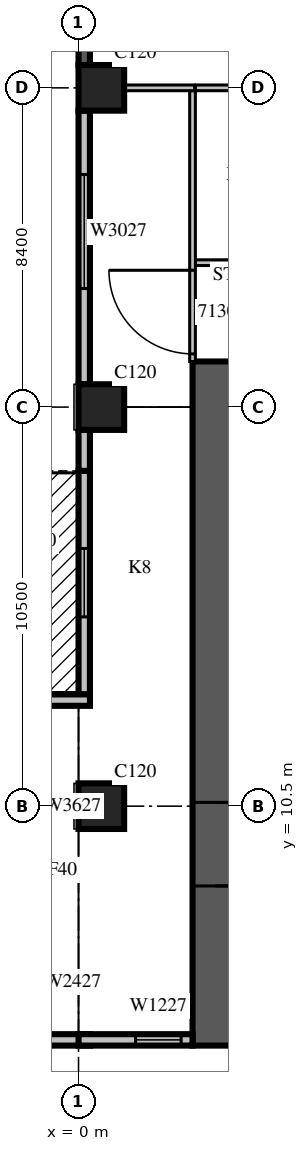
"""IFC4 building model, lengths in metres.
Left out: names, types, materials, properties, quantities, classifications, styles, units other than length and angle.
Written with IfcOpenShell. Run it as: python <this file> out.ifc"""

import sys

from ifc_helpers import new_model, si_unit, direction, frame, frame_2d, origin, origin_2d, place, context, subcontext, project, spatial, rectangle, extrude, source, transform, mapped, element, fill, save


model = new_model("IFC4")
c1 = context("Model", 3, precision=1e-05, world=origin(), true_north=direction((0.0, 1.0)))
c2 = subcontext(c1, "Body", "Model", "MODEL_VIEW")
j1 = project(units=[si_unit("LENGTHUNIT", "METRE"), si_unit("PLANEANGLEUNIT", "RADIAN")], contexts=[c1])
p1 = place(None, origin())
s1 = spatial("IfcSite", under=j1, at=p1, CompositionType="ELEMENT")
p2 = place(p1, origin())
s2 = spatial("IfcBuilding", under=s1, at=p2, CompositionType="ELEMENT")
p3 = place(p2, frame((0.0, 0.0, 65.7)))
s3 = spatial("IfcBuildingStorey", under=s2, at=p3, CompositionType="ELEMENT", Elevation=65.7)
m1 = source(origin(), c2, "Body", "SweptSolid", [
    extrude(rectangle(XDim=1.2, YDim=1.2, at=origin_2d()), origin(), (0.0, 0.0, 1.0), 4.2),
])
for number, where, z_axis, x_axis in (
    (1, (0.6, 10.5, 0.0), (0.0, 0.0, 1.0), (1.0, 0.0, 0.0)),
    (2, (0.6, 21.0, 0.0), (0.0, 0.0, 1.0), (1.0, 0.0, 0.0)),
    (3, (0.6, 29.4, 0.0), (0.0, 0.0, 1.0), (1.0, 0.0, 0.0)),
):
    element("IfcColumn", number, at=place(p3, frame(where, z_axis=z_axis, x_axis=x_axis)), inside=s3, PredefinedType="COLUMN", context=c2, shape_type="MappedRepresentation", body=[
        mapped(m1, transform((0.0, 0.0, 0.0), scale=1.0)),
    ])
m2 = source(origin(), c2, "Body", "SweptSolid", [
    extrude(rectangle(XDim=18.0, YDim=1.2, at=frame_2d((9.0, 0.0))), origin(), (0.0, 0.0, 1.0), 4.2),
])
p4 = place(p3, frame((3.6, 4.2, 0.0), z_axis=(0.0, 0.0, 1.0), x_axis=(0.0, 1.0, 0.0)))
e4 = element("IfcWall", 4, at=p4, inside=s3, PredefinedType="SHEAR", context=c2, shape_type="MappedRepresentation", body=[
    mapped(m2, transform((0.0, 0.0, 0.0), scale=1.0)),
])
m3 = source(origin(), c2, "Body", "SweptSolid", [
    extrude(rectangle(XDim=2.2, YDim=2.1, at=frame_2d((1.1, 1.05))), frame((0.0, 0.61, 0.0), z_axis=(0.0, -1.0, 0.0), x_axis=(1.0, 0.0, 0.0)), (0.0, 0.0, 1.0), 1.22),
])
p5 = place(p4, frame((4.2, 0.0, 0.0)))
e5 = element("IfcOpeningElement", 5, at=p5, cuts=e4, PredefinedType="OPENING", context=c2, shape_type="MappedRepresentation", body=[
    mapped(m3, transform((0.0, 0.0, 0.0), scale=1.0)),
])
m4 = source(origin(), c2, "Body", "SweptSolid", [
    extrude(rectangle(XDim=4.2, YDim=0.3, at=frame_2d((2.1, 0.0))), origin(), (0.0, 0.0, 1.0), 3.8),
])
p6 = place(p3, frame((0.15, 34.2, 0.0), z_axis=(0.0, 0.0, 1.0), x_axis=(0.0, -1.0, 0.0)))
e6 = element("IfcWall", 6, at=p6, inside=s3, PredefinedType="SOLIDWALL", context=c2, shape_type="MappedRepresentation", body=[
    mapped(m4, transform((0.0, 0.0, 0.0), scale=1.0)),
])
m5 = source(origin(), c2, "Body", "SweptSolid", [
    extrude(rectangle(XDim=2.4, YDim=2.7, at=frame_2d((1.2, 1.35))), frame((0.0, 0.16, 0.0), z_axis=(0.0, -1.0, 0.0), x_axis=(1.0, 0.0, 0.0)), (0.0, 0.0, 1.0), 0.32),
])
p7 = place(p6, frame((0.7, 0.0, 0.6)))
e7 = element("IfcOpeningElement", 7, at=p7, cuts=e6, PredefinedType="OPENING", context=c2, shape_type="MappedRepresentation", body=[
    mapped(m5, transform((0.0, 0.0, 0.0), scale=1.0)),
])
m6 = source(origin(), c2, "Body", "SweptSolid", [
    extrude(rectangle(XDim=7.2, YDim=0.3, at=frame_2d((3.6, 0.0))), origin(), (0.0, 0.0, 1.0), 3.8),
])
p8 = place(p3, frame((0.15, 28.8, 0.0), z_axis=(0.0, 0.0, 1.0), x_axis=(0.0, -1.0, 0.0)))
e8 = element("IfcWall", 8, at=p8, inside=s3, PredefinedType="STANDARD", context=c2, shape_type="MappedRepresentation", body=[
    mapped(m6, transform((0.0, 0.0, 0.0), scale=1.0)),
])
m7 = source(origin(), c2, "Body", "SweptSolid", [
    extrude(rectangle(XDim=3.0, YDim=2.7, at=frame_2d((1.5, 1.35))), frame((0.0, 0.16, 0.0), z_axis=(0.0, -1.0, 0.0), x_axis=(1.0, 0.0, 0.0)), (0.0, 0.0, 1.0), 0.32),
])
p9 = place(p8, frame((1.68, 0.0, 0.6)))
e9 = element("IfcOpeningElement", 9, at=p9, cuts=e8, PredefinedType="OPENING", context=c2, shape_type="MappedRepresentation", body=[
    mapped(m7, transform((0.0, 0.0, 0.0), scale=1.0)),
])
m8 = source(origin(), c2, "Body", "SweptSolid", [
    extrude(rectangle(XDim=1.08, YDim=0.3, at=frame_2d((0.54, 0.0))), origin(), (0.0, 0.0, 1.0), 3.8),
])
p10 = place(p3, frame((0.15, 20.4, 0.0), z_axis=(0.0, 0.0, 1.0), x_axis=(0.0, -1.0, 0.0)))
e10 = element("IfcWall", 10, at=p10, inside=s3, PredefinedType="STANDARD", context=c2, shape_type="MappedRepresentation", body=[
    mapped(m8, transform((0.0, 0.0, 0.0), scale=1.0)),
])
m9 = source(origin(), c2, "Body", "SweptSolid", [
    extrude(rectangle(XDim=5.88, YDim=0.3, at=frame_2d((2.94, 0.0))), origin(), (0.0, 0.0, 1.0), 3.8),
])
p11 = place(p3, frame((0.15, 19.32, 0.0), z_axis=(0.0, 0.0, 1.0), x_axis=(0.0, -1.0, 0.0)))
e11 = element("IfcWall", 11, at=p11, inside=s3, PredefinedType="STANDARD", context=c2, shape_type="MappedRepresentation", body=[
    mapped(m9, transform((0.0, 0.0, 0.0), scale=1.0)),
])
m10 = source(origin(), c2, "Body", "SweptSolid", [
    extrude(rectangle(XDim=1.8, YDim=2.4, at=frame_2d((0.9, 1.2))), frame((0.0, 0.16, 0.0), z_axis=(0.0, -1.0, 0.0), x_axis=(1.0, 0.0, 0.0)), (0.0, 0.0, 1.0), 0.32),
])
p12 = place(p11, frame((2.04, 0.0, 0.0)))
e12 = element("IfcOpeningElement", 12, at=p12, cuts=e11, PredefinedType="OPENING", context=c2, shape_type="MappedRepresentation", body=[
    mapped(m10, transform((0.0, 0.0, 0.0), scale=1.0)),
])
m11 = source(origin(), c2, "Body", "SweptSolid", [
    extrude(rectangle(XDim=1.2, YDim=0.3, at=frame_2d((0.6, 0.0))), origin(), (0.0, 0.0, 1.0), 3.8),
])
for number, where, z_axis, x_axis in (
    (13, (0.3, 13.29, 0.0), (0.0, 0.0, 1.0), (-1.0, 0.0, 0.0)),
    (14, (0.3, 4.35, 0.0), (0.0, 0.0, 1.0), (-1.0, 0.0, 0.0)),
):
    element("IfcWall", number, at=place(p3, frame(where, z_axis=z_axis, x_axis=x_axis)), inside=s3, PredefinedType="STANDARD", context=c2, shape_type="MappedRepresentation", body=[
        mapped(m11, transform((0.0, 0.0, 0.0), scale=1.0)),
    ])
m12 = source(origin(), c2, "Body", "SweptSolid", [
    extrude(rectangle(XDim=3.0, YDim=0.3, at=frame_2d((1.5, 0.0))), origin(), (0.0, 0.0, 1.0), 3.8),
])
p13 = place(p3, frame((0.0, 4.35, 0.0), z_axis=(0.0, 0.0, 1.0), x_axis=(1.0, 0.0, 0.0)))
e15 = element("IfcWall", 15, at=p13, inside=s3, PredefinedType="STANDARD", context=c2, shape_type="MappedRepresentation", body=[
    mapped(m12, transform((0.0, 0.0, 0.0), scale=1.0)),
])
m13 = source(origin(), c2, "Body", "SweptSolid", [
    extrude(rectangle(XDim=1.2, YDim=2.7, at=frame_2d((0.6, 1.35))), frame((0.0, 0.16, 0.0), z_axis=(0.0, -1.0, 0.0), x_axis=(1.0, 0.0, 0.0)), (0.0, 0.0, 1.0), 0.32),
])
p14 = place(p13, frame((1.5, 0.0, 0.6)))
e16 = element("IfcOpeningElement", 16, at=p14, cuts=e15, PredefinedType="OPENING", context=c2, shape_type="MappedRepresentation", body=[
    mapped(m13, transform((0.0, 0.0, 0.0), scale=1.0)),
])
m14 = source(origin(), c2, "Body", "SweptSolid", [
    extrude(rectangle(XDim=11.925, YDim=0.15, at=frame_2d((5.963, 0.0))), origin(), (0.0, 0.0, 1.0), 3.8),
])
p15 = place(p3, frame((3.075, 24.8, 0.0), z_axis=(0.0, 0.0, 1.0), x_axis=(1.0, 0.0, 0.0)))
e17 = element("IfcWall", 17, at=p15, inside=s3, PredefinedType="PARTITIONING", context=c2, shape_type="MappedRepresentation", body=[
    mapped(m14, transform((0.0, 0.0, 0.0), scale=1.0)),
])
m15 = source(origin(), c2, "Body", "SweptSolid", [
    extrude(rectangle(XDim=0.9, YDim=2.1, at=frame_2d((0.45, 1.05))), frame((0.0, 0.085, 0.0), z_axis=(0.0, -1.0, 0.0), x_axis=(1.0, 0.0, 0.0)), (0.0, 0.0, 1.0), 0.17),
])
p16 = place(p15, frame((2.062, 0.0, 0.0)))
e18 = element("IfcOpeningElement", 18, at=p16, cuts=e17, PredefinedType="OPENING", context=c2, shape_type="MappedRepresentation", body=[
    mapped(m15, transform((0.0, 0.0, 0.0), scale=1.0)),
])
p17 = place(p15, frame((8.9, 0.0, 0.0)))
e19 = element("IfcOpeningElement", 19, at=p17, cuts=e17, PredefinedType="OPENING", context=c2, shape_type="MappedRepresentation", body=[
    mapped(m15, transform((0.0, 0.0, 0.0), scale=1.0)),
])
m16 = source(origin(), c2, "Body", "SweptSolid", [
    extrude(rectangle(XDim=6.826, YDim=0.15, at=frame_2d((3.413, 0.0))), origin(), (0.0, 0.0, 1.0), 3.8),
])
p18 = place(p3, frame((9.901, 29.4, 0.0), z_axis=(0.0, 0.0, 1.0), x_axis=(-1.0, 0.0, 0.0)))
e20 = element("IfcWall", 20, at=p18, inside=s3, PredefinedType="PARTITIONING", context=c2, shape_type="MappedRepresentation", body=[
    mapped(m16, transform((0.0, 0.0, 0.0), scale=1.0)),
])
m17 = source(origin(), c2, "Body", "SweptSolid", [
    extrude(rectangle(XDim=7.125, YDim=0.15, at=frame_2d((3.562, 0.0))), origin(), (0.0, 0.0, 1.0), 3.8),
])
p19 = place(p3, frame((3.0, 29.325, 0.0), z_axis=(0.0, 0.0, 1.0), x_axis=(0.0, -1.0, 0.0)))
e21 = element("IfcWall", 21, at=p19, inside=s3, PredefinedType="PARTITIONING", context=c2, shape_type="MappedRepresentation", body=[
    mapped(m17, transform((0.0, 0.0, 0.0), scale=1.0)),
])
p20 = place(p19, frame((4.725, 0.0, 0.0)))
e22 = element("IfcOpeningElement", 22, at=p20, cuts=e21, PredefinedType="OPENING", context=c2, shape_type="SweptSolid", body=[
    extrude(rectangle(XDim=2.2, YDim=2.1, at=frame_2d((1.1, 1.05))), frame((0.0, 0.085, 0.0), z_axis=(0.0, -1.0, 0.0), x_axis=(1.0, 0.0, 0.0)), (0.0, 0.0, 1.0), 0.17),
])
m18 = source(origin(), c2, "Body", "SweptSolid", [
    extrude(rectangle(XDim=1.856, YDim=0.15, at=frame_2d((0.928, 0.0))), origin(), (0.0, 0.0, 1.0), 3.8),
])
p21 = place(p3, frame((3.055, 29.4, 0.0), z_axis=(0.0, 0.0, 1.0), x_axis=(-1.0, 0.0, 0.0)))
e23 = element("IfcWall", 23, at=p21, inside=s3, PredefinedType="PARTITIONING", context=c2, shape_type="MappedRepresentation", body=[
    mapped(m18, transform((0.0, 0.0, 0.0), scale=1.0)),
])
m19 = source(origin(), c2, "Body", "SweptSolid", [
    extrude(rectangle(XDim=3.0, YDim=2.7, at=frame_2d((1.5, 1.35))), frame((0.0, 0.03, 0.0), z_axis=(0.0, -1.0, 0.0), x_axis=(1.0, 0.0, 0.0)), (0.0, 0.0, 1.0), 0.06),
])
p22 = place(p9, origin())
e24 = element("IfcWindow", 24, at=p22, inside=s3, PartitioningType="SINGLE_PANEL", PredefinedType="WINDOW", context=c2, shape_type="MappedRepresentation", body=[
    mapped(m19, transform((0.0, 0.0, 0.0), scale=1.0)),
])
fill(e9, e24)
m20 = source(origin(), c2, "Body", "SweptSolid", [
    extrude(rectangle(XDim=1.8, YDim=2.4, at=frame_2d((0.9, 1.2))), frame((0.0, 0.025, 0.0), z_axis=(0.0, -1.0, 0.0), x_axis=(1.0, 0.0, 0.0)), (0.0, 0.0, 1.0), 0.05),
])
p23 = place(p12, origin())
e25 = element("IfcDoor", 25, at=p23, inside=s3, OperationType="SLIDING_TO_LEFT", PredefinedType="DOOR", context=c2, shape_type="MappedRepresentation", body=[
    mapped(m20, transform((0.0, 0.0, 0.0), scale=1.0)),
])
fill(e12, e25)
m21 = source(origin(), c2, "Body", "SweptSolid", [
    extrude(rectangle(XDim=1.2, YDim=2.7, at=frame_2d((0.6, 1.35))), frame((0.0, 0.03, 0.0), z_axis=(0.0, -1.0, 0.0), x_axis=(1.0, 0.0, 0.0)), (0.0, 0.0, 1.0), 0.06),
])
p24 = place(p14, origin())
e26 = element("IfcWindow", 26, at=p24, inside=s3, PartitioningType="SINGLE_PANEL", PredefinedType="WINDOW", context=c2, shape_type="MappedRepresentation", body=[
    mapped(m21, transform((0.0, 0.0, 0.0), scale=1.0)),
])
fill(e16, e26)
m22 = source(origin(), c2, "Body", "SweptSolid", [
    extrude(rectangle(XDim=2.2, YDim=2.1, at=frame_2d((1.1, 1.05))), frame((0.0, 0.025, 0.0), z_axis=(0.0, -1.0, 0.0), x_axis=(1.0, 0.0, 0.0)), (0.0, 0.0, 1.0), 0.05),
])
p25 = place(p5, origin())
e27 = element("IfcDoor", 27, at=p25, inside=s3, OperationType="DOUBLE_DOOR_SINGLE_SWING", PredefinedType="DOOR", context=c2, shape_type="MappedRepresentation", body=[
    mapped(m22, transform((0.0, 0.0, 0.0), scale=1.0)),
])
fill(e5, e27)
p26 = place(p20, origin())
e28 = element("IfcDoor", 28, at=p26, inside=s3, OperationType="DOUBLE_DOOR_SINGLE_SWING", PredefinedType="DOOR", context=c2, shape_type="MappedRepresentation", body=[
    mapped(m22, transform((0.0, 0.0, 0.0), scale=1.0)),
])
fill(e22, e28)
save(model, sys.argv[1])
